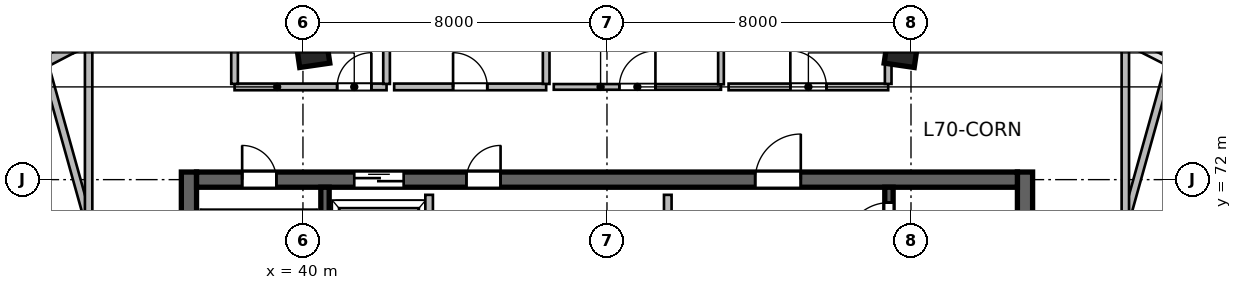
"""IFC4 building model, lengths in metres.
Left out: names, types, materials, properties, quantities, classifications, styles, units other than length and angle.
Written with IfcOpenShell. Run it as: python <this file> out.ifc"""

import sys

from ifc_helpers import new_model, si_unit, direction, frame, frame_2d, origin, origin_2d, place, context, subcontext, project, spatial, rectangle, extrude, source, transform, mapped, element, fill, save


model = new_model("IFC4")
c1 = context("Model", 3, precision=1e-05, world=origin(), true_north=direction((0.0, 1.0)))
c2 = subcontext(c1, "Body", "Model", "MODEL_VIEW")
j1 = project(units=[si_unit("LENGTHUNIT", "METRE"), si_unit("PLANEANGLEUNIT", "RADIAN")], contexts=[c1])
p1 = place(None, origin())
s1 = spatial("IfcSite", under=j1, at=p1, CompositionType="ELEMENT")
p2 = place(p1, origin())
s2 = spatial("IfcBuilding", under=s1, at=p2, CompositionType="ELEMENT")
p3 = place(p2, frame((0.0, 0.0, 287.4)))
s3 = spatial("IfcBuildingStorey", under=s2, at=p3, CompositionType="ELEMENT", Elevation=287.4)
m1 = source(origin(), c2, "Body", "SweptSolid", [
    extrude(rectangle(XDim=12.0, YDim=0.4, at=frame_2d((6.0, 0.0))), origin(), (0.0, 0.0, 1.0), 3.9),
])
for number, where, z_axis, x_axis in (
    (1, (37.0, 60.2, 0.0), (0.0, 0.0, 1.0), (0.0, 1.0, 0.0)),
    (2, (59.0, 60.2, 0.0), (0.0, 0.0, 1.0), (0.0, 1.0, 0.0)),
):
    element("IfcWall", number, at=place(p3, frame(where, z_axis=z_axis, x_axis=x_axis)), inside=s3, PredefinedType="SHEAR", context=c2, shape_type="MappedRepresentation", body=[
        mapped(m1, transform((0.0, 0.0, 0.0), scale=1.0)),
    ])
m2 = source(origin(), c2, "Body", "SweptSolid", [
    extrude(rectangle(XDim=21.6, YDim=0.4, at=frame_2d((10.8, 0.0))), origin(), (0.0, 0.0, 1.0), 3.9),
])
p4 = place(p3, frame((37.2, 72.0, 0.0), z_axis=(0.0, 0.0, 1.0), x_axis=(1.0, 0.0, 0.0)))
e3 = element("IfcWall", 3, at=p4, inside=s3, PredefinedType="SHEAR", context=c2, shape_type="MappedRepresentation", body=[
    mapped(m2, transform((0.0, 0.0, 0.0), scale=1.0)),
])
p5 = place(p4, frame((1.2, 0.0, 0.0)))
e4 = element("IfcOpeningElement", 4, at=p5, cuts=e3, PredefinedType="OPENING", context=c2, shape_type="SweptSolid", body=[
    extrude(rectangle(XDim=0.9, YDim=2.1, at=frame_2d((0.45, 1.05))), frame((0.0, 0.21, 0.0), z_axis=(0.0, -1.0, 0.0), x_axis=(1.0, 0.0, 0.0)), (0.0, 0.0, 1.0), 0.42),
])
p6 = place(p4, frame((14.7, 0.0, 0.0)))
e5 = element("IfcOpeningElement", 5, at=p6, cuts=e3, PredefinedType="OPENING", context=c2, shape_type="SweptSolid", body=[
    extrude(rectangle(XDim=1.2, YDim=2.15, at=frame_2d((0.6, 1.075))), frame((0.0, 0.21, 0.0), z_axis=(0.0, -1.0, 0.0), x_axis=(1.0, 0.0, 0.0)), (0.0, 0.0, 1.0), 0.42),
])
p7 = place(p4, frame((4.15, 0.0, 0.0)))
e6 = element("IfcOpeningElement", 6, at=p7, cuts=e3, PredefinedType="OPENING", context=c2, shape_type="SweptSolid", body=[
    extrude(rectangle(XDim=1.3, YDim=2.15, at=frame_2d((0.65, 1.075))), frame((0.0, 0.21, 0.0), z_axis=(0.0, -1.0, 0.0), x_axis=(1.0, 0.0, 0.0)), (0.0, 0.0, 1.0), 0.42),
])
p8 = place(p4, frame((7.1, 0.0, 0.0)))
e7 = element("IfcOpeningElement", 7, at=p8, cuts=e3, PredefinedType="OPENING", context=c2, shape_type="SweptSolid", body=[
    extrude(rectangle(XDim=0.9, YDim=2.1, at=frame_2d((0.45, 1.05))), frame((0.0, 0.21, 0.0), z_axis=(0.0, -1.0, 0.0), x_axis=(1.0, 0.0, 0.0)), (0.0, 0.0, 1.0), 0.42),
])
m3 = source(origin(), c2, "Body", "SweptSolid", [
    extrude(rectangle(XDim=11.2, YDim=0.22, at=frame_2d((5.6, 0.0))), origin(), (0.0, 0.0, 1.0), 3.9),
])
p9 = place(p3, frame((40.58, 60.6, 0.0), z_axis=(0.0, 0.0, 1.0), x_axis=(0.0, 1.0, 0.0)))
e8 = element("IfcWall", 8, at=p9, inside=s3, PredefinedType="SHEAR", context=c2, shape_type="MappedRepresentation", body=[
    mapped(m3, transform((0.0, 0.0, 0.0), scale=1.0)),
])
p10 = place(p3, frame((55.42, 60.6, 0.0), z_axis=(0.0, 0.0, 1.0), x_axis=(0.0, 1.0, 0.0)))
e9 = element("IfcWall", 9, at=p10, inside=s3, PredefinedType="SHEAR", context=c2, shape_type="MappedRepresentation", body=[
    mapped(m3, transform((0.0, 0.0, 0.0), scale=1.0)),
])
p11 = place(p10, frame((9.645, 0.0, 0.0)))
e10 = element("IfcOpeningElement", 10, at=p11, cuts=e9, PredefinedType="OPENING", context=c2, shape_type="SweptSolid", body=[
    extrude(rectangle(XDim=1.15, YDim=2.15, at=frame_2d((0.575, 1.075))), frame((0.0, 0.12, 0.0), z_axis=(0.0, -1.0, 0.0), x_axis=(1.0, 0.0, 0.0)), (0.0, 0.0, 1.0), 0.24),
])
m4 = source(origin(), c2, "Body", "SweptSolid", [
    extrude(rectangle(XDim=0.8, YDim=0.8, at=origin_2d()), origin(), (0.0, 0.0, 1.0), 3.9),
])
for number, where, z_axis, x_axis in (
    (11, (40.253, 75.404, 0.0), (0.0, 0.0, 1.0), (-0.143, 0.99, 0.0)),
    (12, (55.747, 75.404, 0.0), (0.0, 0.0, 1.0), (0.143, 0.99, 0.0)),
):
    element("IfcColumn", number, at=place(p3, frame(where, z_axis=z_axis, x_axis=x_axis)), inside=s3, PredefinedType="COLUMN", context=c2, shape_type="MappedRepresentation", body=[
        mapped(m4, transform((0.0, 0.0, 0.0), scale=1.0)),
    ])
m5 = source(origin(), c2, "Body", "SweptSolid", [
    extrude(rectangle(XDim=2.711, YDim=0.28, at=frame_2d((1.356, 0.0))), origin(), (0.0, 0.0, 1.0), 3.64),
])
p12 = place(p3, frame((31.502, 74.205, 0.0), z_axis=(0.0, 0.0, 1.0), x_axis=(0.886828760751, 0.462098202881, 0.0)))
e13 = element("IfcWall", 13, at=p12, inside=s3, PredefinedType="SOLIDWALL", context=c2, shape_type="MappedRepresentation", body=[
    mapped(m5, transform((0.0, 0.0, 0.0), scale=1.0)),
])
m6 = source(origin(), c2, "Body", "SweptSolid", [
    extrude(rectangle(XDim=2.673, YDim=0.28, at=frame_2d((1.337, 0.0))), origin(), (0.0, 0.0, 1.0), 3.64),
])
p13 = place(p3, frame((33.907, 75.458, 0.0), z_axis=(0.0, 0.0, 1.0), x_axis=(0.919036345912, 0.394172798266, 0.0)))
e14 = element("IfcWall", 14, at=p13, inside=s3, PredefinedType="SOLIDWALL", context=c2, shape_type="MappedRepresentation", body=[
    mapped(m6, transform((0.0, 0.0, 0.0), scale=1.0)),
])
m7 = source(origin(), c2, "Body", "SweptSolid", [
    extrude(rectangle(XDim=5.8, YDim=0.2, at=frame_2d((2.9, 0.0))), origin(), (0.0, 0.0, 1.0), 3.64),
])
p14 = place(p3, frame((49.6, 65.8, 0.0), z_axis=(0.0, 0.0, 1.0), x_axis=(0.0, 1.0, 0.0)))
e15 = element("IfcWall", 15, at=p14, inside=s3, PredefinedType="SOLIDWALL", context=c2, shape_type="MappedRepresentation", body=[
    mapped(m7, transform((0.0, 0.0, 0.0), scale=1.0)),
])
m8 = source(origin(), c2, "Body", "SweptSolid", [
    extrude(rectangle(XDim=3.2, YDim=0.2, at=frame_2d((1.6, 0.0))), origin(), (0.0, 0.0, 1.0), 3.64),
])
p15 = place(p3, frame((43.32, 68.4, 0.0), z_axis=(0.0, 0.0, 1.0), x_axis=(0.0, 1.0, 0.0)))
e16 = element("IfcWall", 16, at=p15, inside=s3, PredefinedType="SOLIDWALL", context=c2, shape_type="MappedRepresentation", body=[
    mapped(m8, transform((0.0, 0.0, 0.0), scale=1.0)),
])
m9 = source(origin(), c2, "Body", "SweptSolid", [
    extrude(rectangle(XDim=4.0, YDim=0.175, at=frame_2d((2.0, 0.0))), origin(), (0.0, 0.0, 1.0), 3.64),
])
p16 = place(p3, frame((38.2, 74.44, 0.0), z_axis=(0.0, 0.0, 1.0), x_axis=(1.0, 0.0, 0.0)))
e17 = element("IfcWall", 17, at=p16, inside=s3, PredefinedType="PARTITIONING", context=c2, shape_type="MappedRepresentation", body=[
    mapped(m9, transform((0.0, 0.0, 0.0), scale=1.0)),
])
p17 = place(p16, frame((2.7, 0.0, 0.0)))
e18 = element("IfcOpeningElement", 18, at=p17, cuts=e17, PredefinedType="OPENING", context=c2, shape_type="SweptSolid", body=[
    extrude(rectangle(XDim=0.9, YDim=2.08, at=frame_2d((0.45, 1.04))), frame((0.0, 0.098, 0.0), z_axis=(0.0, -1.0, 0.0), x_axis=(1.0, 0.0, 0.0)), (0.0, 0.0, 1.0), 0.195),
])
m10 = source(origin(), c2, "Body", "SweptSolid", [
    extrude(rectangle(XDim=2.403, YDim=0.175, at=frame_2d((1.201, 0.0))), origin(), (0.0, 0.0, 1.0), 3.64),
])
for number, where, z_axis, x_axis in (
    (19, (38.2, 74.519, 0.0), (0.0, 0.0, 1.0), (0.0, 1.0, 0.0)),
    (20, (42.2, 74.519, 0.0), (0.0, 0.0, 1.0), (0.0, 1.0, 0.0)),
):
    element("IfcWall", number, at=place(p3, frame(where, z_axis=z_axis, x_axis=x_axis)), inside=s3, PredefinedType="PARTITIONING", context=c2, shape_type="MappedRepresentation", body=[
        mapped(m10, transform((0.0, 0.0, 0.0), scale=1.0)),
    ])
p18 = place(p3, frame((42.4, 74.44, 0.0), z_axis=(0.0, 0.0, 1.0), x_axis=(1.0, 0.0, 0.0)))
e21 = element("IfcWall", 21, at=p18, inside=s3, PredefinedType="PARTITIONING", context=c2, shape_type="MappedRepresentation", body=[
    mapped(m9, transform((0.0, 0.0, 0.0), scale=1.0)),
])
p19 = place(p18, frame((1.55, 0.0, 0.0)))
e22 = element("IfcOpeningElement", 22, at=p19, cuts=e21, PredefinedType="OPENING", context=c2, shape_type="SweptSolid", body=[
    extrude(rectangle(XDim=0.9, YDim=2.08, at=frame_2d((0.45, 1.04))), frame((0.0, 0.098, 0.0), z_axis=(0.0, -1.0, 0.0), x_axis=(1.0, 0.0, 0.0)), (0.0, 0.0, 1.0), 0.195),
])
p20 = place(p3, frame((46.4, 74.519, 0.0), z_axis=(0.0, 0.0, 1.0), x_axis=(0.0, 1.0, 0.0)))
e23 = element("IfcWall", 23, at=p20, inside=s3, PredefinedType="PARTITIONING", context=c2, shape_type="MappedRepresentation", body=[
    mapped(m10, transform((0.0, 0.0, 0.0), scale=1.0)),
])
m11 = source(origin(), c2, "Body", "SweptSolid", [
    extrude(rectangle(XDim=4.4, YDim=0.15, at=frame_2d((2.2, 0.0))), origin(), (0.0, 0.0, 1.0), 3.64),
])
p21 = place(p3, frame((46.6, 74.44, 0.0), z_axis=(0.0, 0.0, 1.0), x_axis=(1.0, 0.0, 0.0)))
e24 = element("IfcWall", 24, at=p21, inside=s3, PredefinedType="PARTITIONING", context=c2, shape_type="MappedRepresentation", body=[
    mapped(m11, transform((0.0, 0.0, 0.0), scale=1.0)),
])
p22 = place(p21, frame((1.725, 0.0, 0.0)))
e25 = element("IfcOpeningElement", 25, at=p22, cuts=e24, PredefinedType="OPENING", context=c2, shape_type="SweptSolid", body=[
    extrude(rectangle(XDim=0.95, YDim=2.1, at=frame_2d((0.475, 1.05))), frame((0.0, 0.085, 0.0), z_axis=(0.0, -1.0, 0.0), x_axis=(1.0, 0.0, 0.0)), (0.0, 0.0, 1.0), 0.17),
])
m12 = source(origin(), c2, "Body", "SweptSolid", [
    extrude(rectangle(XDim=2.425, YDim=0.15, at=frame_2d((1.212, 0.0))), origin(), (0.0, 0.0, 1.0), 3.64),
])
p23 = place(p3, frame((51.0, 74.508, 0.0), z_axis=(0.0, 0.0, 1.0), x_axis=(0.0, 1.0, 0.0)))
e26 = element("IfcWall", 26, at=p23, inside=s3, PredefinedType="PARTITIONING", context=c2, shape_type="MappedRepresentation", body=[
    mapped(m12, transform((0.0, 0.0, 0.0), scale=1.0)),
])
m13 = source(origin(), c2, "Body", "SweptSolid", [
    extrude(rectangle(XDim=4.2, YDim=0.175, at=frame_2d((2.1, 0.0))), origin(), (0.0, 0.0, 1.0), 3.64),
])
p24 = place(p3, frame((51.2, 74.44, 0.0), z_axis=(0.0, 0.0, 1.0), x_axis=(1.0, 0.0, 0.0)))
e27 = element("IfcWall", 27, at=p24, inside=s3, PredefinedType="PARTITIONING", context=c2, shape_type="MappedRepresentation", body=[
    mapped(m13, transform((0.0, 0.0, 0.0), scale=1.0)),
])
p25 = place(p24, frame((1.625, 0.0, 0.0)))
e28 = element("IfcOpeningElement", 28, at=p25, cuts=e27, PredefinedType="OPENING", context=c2, shape_type="SweptSolid", body=[
    extrude(rectangle(XDim=0.95, YDim=2.12, at=frame_2d((0.475, 1.06))), frame((0.0, 0.098, 0.0), z_axis=(0.0, -1.0, 0.0), x_axis=(1.0, 0.0, 0.0)), (0.0, 0.0, 1.0), 0.195),
])
p26 = place(p3, frame((55.4, 74.519, 0.0), z_axis=(0.0, 0.0, 1.0), x_axis=(0.0, 1.0, 0.0)))
e29 = element("IfcWall", 29, at=p26, inside=s3, PredefinedType="PARTITIONING", context=c2, shape_type="MappedRepresentation", body=[
    mapped(m10, transform((0.0, 0.0, 0.0), scale=1.0)),
])
m14 = source(origin(), c2, "Body", "SweptSolid", [
    extrude(rectangle(XDim=12.311, YDim=0.195, at=frame_2d((6.155, 0.0))), origin(), (0.0, 0.0, 1.0), 3.64),
])
p27 = place(p3, frame((36.5, 63.216, 0.0), z_axis=(0.0, 0.0, 1.0), x_axis=(-0.268759602651, 0.963207286093, 0.0)))
e30 = element("IfcWall", 30, at=p27, inside=s3, PredefinedType="PARTITIONING", context=c2, shape_type="MappedRepresentation", body=[
    mapped(m14, transform((0.0, 0.0, 0.0), scale=1.0)),
])
m15 = source(origin(), c2, "Body", "SweptSolid", [
    extrude(rectangle(XDim=17.681, YDim=0.195, at=frame_2d((8.84, 0.0))), origin(), (0.0, 0.0, 1.0), 3.64),
])
p28 = place(p3, frame((34.36, 57.96, 0.0), z_axis=(0.0, 0.0, 1.0), x_axis=(0.0, 1.0, 0.0)))
e31 = element("IfcWall", 31, at=p28, inside=s3, PredefinedType="PARTITIONING", context=c2, shape_type="MappedRepresentation", body=[
    mapped(m15, transform((0.0, 0.0, 0.0), scale=1.0)),
])
m16 = source(origin(), c2, "Body", "SweptSolid", [
    extrude(rectangle(XDim=12.307, YDim=0.195, at=frame_2d((6.153, 0.0))), origin(), (0.0, 0.0, 1.0), 3.64),
])
p29 = place(p3, frame((59.5, 63.216, 0.0), z_axis=(0.0, 0.0, 1.0), x_axis=(0.268768150257, 0.96320490105, 0.0)))
e32 = element("IfcWall", 32, at=p29, inside=s3, PredefinedType="PARTITIONING", context=c2, shape_type="MappedRepresentation", body=[
    mapped(m16, transform((0.0, 0.0, 0.0), scale=1.0)),
])
m17 = source(origin(), c2, "Body", "SweptSolid", [
    extrude(rectangle(XDim=17.664, YDim=0.195, at=frame_2d((8.832, 0.0))), origin(), (0.0, 0.0, 1.0), 3.64),
])
p30 = place(p3, frame((61.333, 55.602, 0.0), z_axis=(0.0, 0.0, 1.0), x_axis=(0.368827513738, 0.929497856431, 0.0)))
e33 = element("IfcWall", 33, at=p30, inside=s3, PredefinedType="PARTITIONING", context=c2, shape_type="MappedRepresentation", body=[
    mapped(m17, transform((0.0, 0.0, 0.0), scale=1.0)),
])
m18 = source(origin(), c2, "Body", "SweptSolid", [
    extrude(rectangle(XDim=17.693, YDim=0.195, at=frame_2d((8.847, 0.0))), origin(), (0.0, 0.0, 1.0), 3.64),
])
p31 = place(p3, frame((61.64, 57.96, 0.0), z_axis=(0.0, 0.0, 1.0), x_axis=(0.0, 1.0, 0.0)))
e34 = element("IfcWall", 34, at=p31, inside=s3, PredefinedType="PARTITIONING", context=c2, shape_type="MappedRepresentation", body=[
    mapped(m18, transform((0.0, 0.0, 0.0), scale=1.0)),
])
m19 = source(origin(), c2, "Body", "SweptSolid", [
    extrude(rectangle(XDim=0.9, YDim=2.1, at=frame_2d((0.45, 1.05))), frame((0.0, 0.025, 0.0), z_axis=(0.0, -1.0, 0.0), x_axis=(1.0, 0.0, 0.0)), (0.0, 0.0, 1.0), 0.05),
])
p32 = place(p5, origin())
e35 = element("IfcDoor", 35, at=p32, inside=s3, OperationType="SINGLE_SWING_LEFT", PredefinedType="DOOR", context=c2, shape_type="MappedRepresentation", body=[
    mapped(m19, transform((0.0, 0.0, 0.0), scale=1.0)),
])
fill(e4, e35)
m20 = source(origin(), c2, "Body", "SweptSolid", [
    extrude(rectangle(XDim=1.15, YDim=2.15, at=frame_2d((0.575, 1.075))), frame((0.0, 0.025, 0.0), z_axis=(0.0, -1.0, 0.0), x_axis=(1.0, 0.0, 0.0)), (0.0, 0.0, 1.0), 0.05),
])
p33 = place(p11, origin())
e36 = element("IfcDoor", 36, at=p33, inside=s3, OperationType="SINGLE_SWING_LEFT", PredefinedType="DOOR", context=c2, shape_type="MappedRepresentation", body=[
    mapped(m20, transform((0.0, 0.0, 0.0), scale=1.0)),
])
fill(e10, e36)
m21 = source(origin(), c2, "Body", "SweptSolid", [
    extrude(rectangle(XDim=1.2, YDim=2.15, at=frame_2d((0.6, 1.075))), frame((0.0, 0.025, 0.0), z_axis=(0.0, -1.0, 0.0), x_axis=(1.0, 0.0, 0.0)), (0.0, 0.0, 1.0), 0.05),
])
p34 = place(p6, origin())
e37 = element("IfcDoor", 37, at=p34, inside=s3, OperationType="SINGLE_SWING_RIGHT", PredefinedType="DOOR", context=c2, shape_type="MappedRepresentation", body=[
    mapped(m21, transform((0.0, 0.0, 0.0), scale=1.0)),
])
fill(e5, e37)
m22 = source(origin(), c2, "Body", "SweptSolid", [
    extrude(rectangle(XDim=1.3, YDim=2.15, at=frame_2d((0.65, 1.075))), frame((0.0, 0.025, 0.0), z_axis=(0.0, -1.0, 0.0), x_axis=(1.0, 0.0, 0.0)), (0.0, 0.0, 1.0), 0.05),
])
p35 = place(p7, origin())
e38 = element("IfcDoor", 38, at=p35, inside=s3, OperationType="DOUBLE_DOOR_SLIDING", PredefinedType="DOOR", context=c2, shape_type="MappedRepresentation", body=[
    mapped(m22, transform((0.0, 0.0, 0.0), scale=1.0)),
])
fill(e6, e38)
p36 = place(p8, origin())
e39 = element("IfcDoor", 39, at=p36, inside=s3, OperationType="SINGLE_SWING_RIGHT", PredefinedType="DOOR", context=c2, shape_type="MappedRepresentation", body=[
    mapped(m19, transform((0.0, 0.0, 0.0), scale=1.0)),
])
fill(e7, e39)
m23 = source(origin(), c2, "Body", "SweptSolid", [
    extrude(rectangle(XDim=0.9, YDim=2.08, at=frame_2d((0.45, 1.04))), frame((0.0, 0.025, 0.0), z_axis=(0.0, -1.0, 0.0), x_axis=(1.0, 0.0, 0.0)), (0.0, 0.0, 1.0), 0.05),
])
p37 = place(p17, origin())
e40 = element("IfcDoor", 40, at=p37, inside=s3, OperationType="SINGLE_SWING_RIGHT", PredefinedType="DOOR", context=c2, shape_type="MappedRepresentation", body=[
    mapped(m23, transform((0.0, 0.0, 0.0), scale=1.0)),
])
fill(e18, e40)
p38 = place(p19, origin())
e41 = element("IfcDoor", 41, at=p38, inside=s3, OperationType="SINGLE_SWING_LEFT", PredefinedType="DOOR", context=c2, shape_type="MappedRepresentation", body=[
    mapped(m23, transform((0.0, 0.0, 0.0), scale=1.0)),
])
fill(e22, e41)
m24 = source(origin(), c2, "Body", "SweptSolid", [
    extrude(rectangle(XDim=0.95, YDim=2.1, at=frame_2d((0.475, 1.05))), frame((0.0, 0.025, 0.0), z_axis=(0.0, -1.0, 0.0), x_axis=(1.0, 0.0, 0.0)), (0.0, 0.0, 1.0), 0.05),
])
p39 = place(p22, origin())
e42 = element("IfcDoor", 42, at=p39, inside=s3, OperationType="SINGLE_SWING_RIGHT", PredefinedType="DOOR", context=c2, shape_type="MappedRepresentation", body=[
    mapped(m24, transform((0.0, 0.0, 0.0), scale=1.0)),
])
fill(e25, e42)
m25 = source(origin(), c2, "Body", "SweptSolid", [
    extrude(rectangle(XDim=0.95, YDim=2.12, at=frame_2d((0.475, 1.06))), frame((0.0, 0.025, 0.0), z_axis=(0.0, -1.0, 0.0), x_axis=(1.0, 0.0, 0.0)), (0.0, 0.0, 1.0), 0.05),
])
p40 = place(p25, origin())
e43 = element("IfcDoor", 43, at=p40, inside=s3, OperationType="SINGLE_SWING_LEFT", PredefinedType="DOOR", context=c2, shape_type="MappedRepresentation", body=[
    mapped(m25, transform((0.0, 0.0, 0.0), scale=1.0)),
])
fill(e28, e43)
save(model, sys.argv[1])
